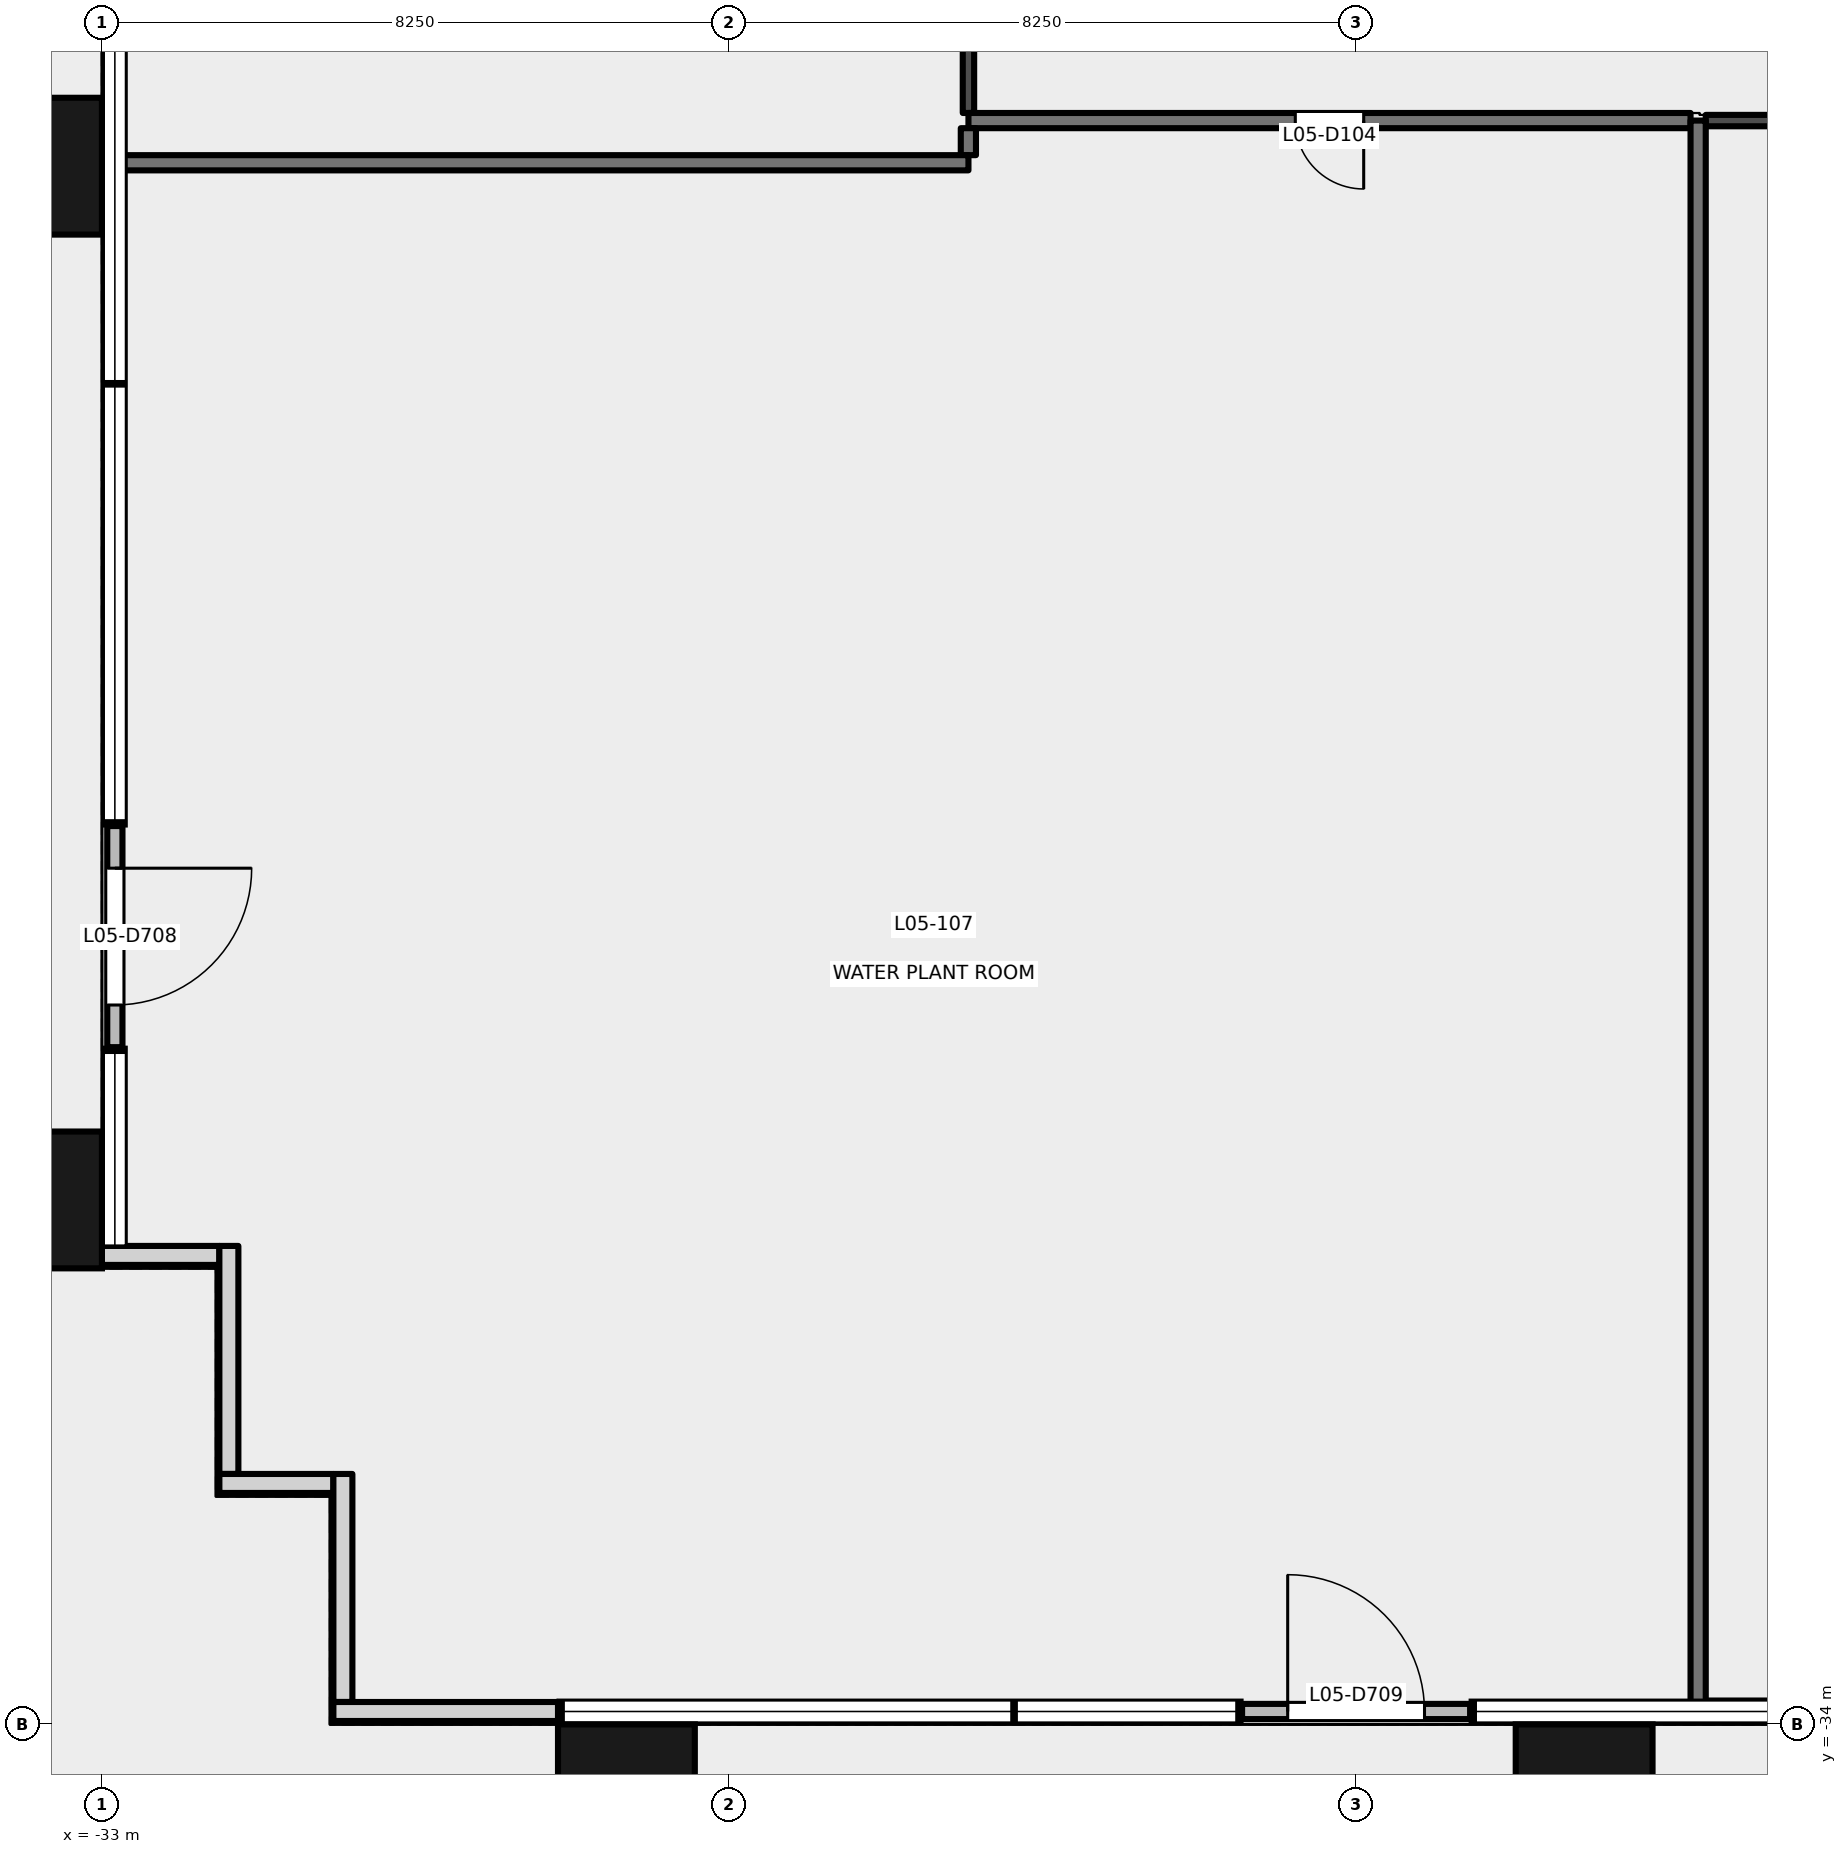
"""IFC4 building model, lengths in metres.
Left out: names, types, materials, properties, quantities, classifications, styles, units other than length and angle.
Written with IfcOpenShell. Run it as: python <this file> out.ifc"""

import sys

from ifc_helpers import new_model, si_unit, direction, frame, frame_2d, origin, origin_2d, place, context, subcontext, project, spatial, rectangle, extrude, element, fill, save


model = new_model("IFC4")
c1 = context("Model", 3, precision=1e-05, world=origin(), true_north=direction((0.0, 1.0)))
c2 = subcontext(c1, "Body", "Model", "MODEL_VIEW")
j1 = project(units=[si_unit("LENGTHUNIT", "METRE"), si_unit("PLANEANGLEUNIT", "RADIAN")], contexts=[c1])
p1 = place(None, origin())
s1 = spatial("IfcSite", under=j1, at=p1, CompositionType="ELEMENT")
p2 = place(p1, origin())
s2 = spatial("IfcBuilding", under=s1, at=p2, CompositionType="ELEMENT")
p3 = place(p2, frame((0.0, 0.0, 27.0)))
s3 = spatial("IfcBuildingStorey", under=s2, at=p3, CompositionType="ELEMENT", Elevation=27.0)
for number, where, z_axis, x_axis in (
    (1, (-26.1, -34.9, -0.2), (0.0, 0.0, 1.0), (1.0, 0.0, 0.0)),
    (2, (-13.5, -34.9, -0.2), (0.0, 0.0, 1.0), (1.0, 0.0, 0.0)),
    (3, (-33.9, -27.1, -0.2), (0.0, 0.0, 1.0), (0.0, 1.0, 0.0)),
    (4, (-33.9, -13.5, -0.2), (0.0, 0.0, 1.0), (0.0, 1.0, 0.0)),
):
    element("IfcColumn", number, at=place(p3, frame(where, z_axis=z_axis, x_axis=x_axis)), inside=s3, PredefinedType="COLUMN", context=c2, shape_type="SweptSolid", body=[
        extrude(rectangle(XDim=1.8, YDim=1.8, at=origin_2d()), origin(), (0.0, 0.0, 1.0), 5.4),
    ])
p4 = place(p3, frame((-32.83, -22.181, 0.0), z_axis=(0.0, 0.0, 1.0), x_axis=(0.0, -1.0, 0.0)))
e5 = element("IfcWall", 5, at=p4, inside=s3, PredefinedType="SOLIDWALL", context=c2, shape_type="SweptSolid", body=[
    extrude(rectangle(XDim=2.909, YDim=0.2, at=frame_2d((1.455, 0.0))), origin(), (0.0, 0.0, 1.0), 4.1),
])
p5 = place(p4, frame((0.554, 0.0, 0.0)))
e6 = element("IfcOpeningElement", 6, at=p5, cuts=e5, PredefinedType="OPENING", context=c2, shape_type="SweptSolid", body=[
    extrude(rectangle(XDim=1.8, YDim=2.4, at=frame_2d((0.9, 1.2))), frame((0.0, 0.111, 0.0), z_axis=(0.0, -1.0, 0.0), x_axis=(1.0, 0.0, 0.0)), (0.0, 0.0, 1.0), 0.221),
])
p6 = place(p3, frame((-33.005, -27.83, 0.0), z_axis=(0.0, 0.0, 1.0), x_axis=(1.0, 0.0, 0.0)))
e7 = element("IfcWall", 7, at=p6, inside=s3, PredefinedType="SOLIDWALL", context=c2, shape_type="SweptSolid", body=[
    extrude(rectangle(XDim=1.55, YDim=0.25, at=frame_2d((0.775, 0.0))), origin(), (0.0, 0.0, 1.0), 5.2),
])
p7 = place(p3, frame((-31.33, -27.705, 0.0), z_axis=(0.0, 0.0, 1.0), x_axis=(0.0, -1.0, 0.0)))
e8 = element("IfcWall", 8, at=p7, inside=s3, PredefinedType="SOLIDWALL", context=c2, shape_type="SweptSolid", body=[
    extrude(rectangle(XDim=3.0, YDim=0.25, at=frame_2d((1.5, 0.0))), origin(), (0.0, 0.0, 1.0), 5.2),
])
p8 = place(p3, frame((-31.455, -30.83, 0.0), z_axis=(0.0, 0.0, 1.0), x_axis=(1.0, 0.0, 0.0)))
e9 = element("IfcWall", 9, at=p8, inside=s3, PredefinedType="SOLIDWALL", context=c2, shape_type="SweptSolid", body=[
    extrude(rectangle(XDim=1.5, YDim=0.25, at=frame_2d((0.75, 0.0))), origin(), (0.0, 0.0, 1.0), 5.2),
])
p9 = place(p3, frame((-29.83, -30.705, 0.0), z_axis=(0.0, 0.0, 1.0), x_axis=(0.0, -1.0, 0.0)))
e10 = element("IfcWall", 10, at=p9, inside=s3, PredefinedType="SOLIDWALL", context=c2, shape_type="SweptSolid", body=[
    extrude(rectangle(XDim=3.0, YDim=0.25, at=frame_2d((1.5, 0.0))), origin(), (0.0, 0.0, 1.0), 5.2),
])
p10 = place(p3, frame((-29.955, -33.83, 0.0), z_axis=(0.0, 0.0, 1.0), x_axis=(1.0, 0.0, 0.0)))
e11 = element("IfcWall", 11, at=p10, inside=s3, PredefinedType="SOLIDWALL", context=c2, shape_type="SweptSolid", body=[
    extrude(rectangle(XDim=2.955, YDim=0.25, at=frame_2d((1.478, 0.0))), origin(), (0.0, 0.0, 1.0), 5.2),
])
p11 = place(p3, frame((-18.0, -33.83, 0.0), z_axis=(0.0, 0.0, 1.0), x_axis=(1.0, 0.0, 0.0)))
e12 = element("IfcWall", 12, at=p11, inside=s3, PredefinedType="SOLIDWALL", context=c2, shape_type="SweptSolid", body=[
    extrude(rectangle(XDim=3.0, YDim=0.2, at=frame_2d((1.5, 0.0))), origin(), (0.0, 0.0, 1.0), 4.1),
])
p12 = place(p11, frame((0.6, 0.0, 0.0)))
e13 = element("IfcOpeningElement", 13, at=p12, cuts=e12, PredefinedType="OPENING", context=c2, shape_type="SweptSolid", body=[
    extrude(rectangle(XDim=1.8, YDim=2.4, at=frame_2d((0.9, 1.2))), frame((0.0, 0.111, 0.0), z_axis=(0.0, -1.0, 0.0), x_axis=(1.0, 0.0, 0.0)), (0.0, 0.0, 1.0), 0.221),
])
p13 = place(p3, frame((-21.6, -12.8, 0.0), z_axis=(0.0, 0.0, 1.0), x_axis=(0.0, 1.0, 0.0)))
e14 = element("IfcWall", 14, at=p13, inside=s3, PredefinedType="PARTITIONING", context=c2, shape_type="SweptSolid", body=[
    extrude(rectangle(XDim=5.4, YDim=0.15, at=frame_2d((2.7, 0.0))), origin(), (0.0, 0.0, 1.0), 4.6),
])
p14 = place(p13, frame((2.575, 0.0, 0.0)))
e15 = element("IfcOpeningElement", 15, at=p14, cuts=e14, PredefinedType="OPENING", context=c2, shape_type="SweptSolid", body=[
    extrude(rectangle(XDim=1.8, YDim=2.1, at=frame_2d((0.9, 1.05))), frame((0.0, 0.085, 0.0), z_axis=(0.0, -1.0, 0.0), x_axis=(1.0, 0.0, 0.0)), (0.0, 0.0, 1.0), 0.171),
])
p15 = place(p3, frame((-0.09, -12.9, 0.0), z_axis=(0.0, 0.0, 1.0), x_axis=(-1.0, 0.0, 0.0)))
e16 = element("IfcWall", 16, at=p15, inside=s3, PredefinedType="PARTITIONING", context=c2, shape_type="SweptSolid", body=[
    extrude(rectangle(XDim=11.81, YDim=0.15, at=frame_2d((5.905, 0.0))), origin(), (0.0, 0.0, 1.0), 4.2),
])
p16 = place(p15, frame((2.627, 0.0, 0.0)))
e17 = element("IfcOpeningElement", 17, at=p16, cuts=e16, PredefinedType="OPENING", context=c2, shape_type="SweptSolid", body=[
    extrude(rectangle(XDim=1.8, YDim=2.1, at=frame_2d((0.9, 1.05))), frame((0.0, 0.085, 0.0), z_axis=(0.0, -1.0, 0.0), x_axis=(1.0, 0.0, 0.0)), (0.0, 0.0, 1.0), 0.171),
])
p17 = place(p15, frame((6.919, 0.0, 0.0)))
e18 = element("IfcOpeningElement", 18, at=p17, cuts=e16, PredefinedType="OPENING", context=c2, shape_type="SweptSolid", body=[
    extrude(rectangle(XDim=2.4, YDim=2.4, at=frame_2d((1.2, 1.2))), frame((0.0, 0.085, 0.0), z_axis=(0.0, -1.0, 0.0), x_axis=(1.0, 0.0, 0.0)), (0.0, 0.0, 1.0), 0.171),
])
p18 = place(p3, frame((-12.1, -12.9, 0.0), z_axis=(0.0, 0.0, 1.0), x_axis=(-1.0, 0.0, 0.0)))
e19 = element("IfcWall", 19, at=p18, inside=s3, PredefinedType="PARTITIONING", context=c2, shape_type="SweptSolid", body=[
    extrude(rectangle(XDim=9.5, YDim=0.2, at=frame_2d((4.75, 0.0))), origin(), (0.0, 0.0, 1.0), 3.8),
])
p19 = place(p18, frame((4.3, 0.0, 0.0)))
e20 = element("IfcOpeningElement", 20, at=p19, cuts=e19, PredefinedType="OPENING", context=c2, shape_type="SweptSolid", body=[
    extrude(rectangle(XDim=0.9, YDim=2.1, at=frame_2d((0.45, 1.05))), frame((0.0, 0.111, 0.0), z_axis=(0.0, -1.0, 0.0), x_axis=(1.0, 0.0, 0.0)), (0.0, 0.0, 1.0), 0.221),
])
p20 = place(p3, frame((-21.601, -13.0, 0.0), z_axis=(0.0, 0.0, 1.0), x_axis=(0.0, -1.0, 0.0)))
e21 = element("IfcWall", 21, at=p20, inside=s3, PredefinedType="PARTITIONING", context=c2, shape_type="SweptSolid", body=[
    extrude(rectangle(XDim=0.355, YDim=0.2, at=frame_2d((0.177, 0.0))), origin(), (0.0, 0.0, 1.0), 4.6),
])
p21 = place(p3, frame((-21.6, -13.455, 0.0), z_axis=(0.0, 0.0, 1.0), x_axis=(-1.0, 0.0, 0.0)))
e22 = element("IfcWall", 22, at=p21, inside=s3, PredefinedType="PARTITIONING", context=c2, shape_type="SweptSolid", body=[
    extrude(rectangle(XDim=11.14, YDim=0.2, at=frame_2d((5.57, 0.0))), origin(), (0.0, 0.0, 1.0), 4.6),
])
p22 = place(p3, frame((-12.0, -33.74, 0.0), z_axis=(0.0, 0.0, 1.0), x_axis=(0.0, 1.0, 0.0)))
e23 = element("IfcWall", 23, at=p22, inside=s3, PredefinedType="PARTITIONING", context=c2, shape_type="SweptSolid", body=[
    extrude(rectangle(XDim=20.84, YDim=0.2, at=frame_2d((10.42, 0.0))), origin(), (0.0, 0.0, 1.0), 5.2),
])
p23 = place(p5, origin())
e24 = element("IfcDoor", 24, at=p23, inside=s3, OperationType="DOUBLE_DOOR_SINGLE_SWING", PredefinedType="DOOR", context=c2, shape_type="SweptSolid", body=[
    extrude(rectangle(XDim=1.8, YDim=2.4, at=frame_2d((0.9, 1.2))), frame((0.0, 0.025, 0.0), z_axis=(0.0, -1.0, 0.0), x_axis=(1.0, 0.0, 0.0)), (0.0, 0.0, 1.0), 0.05),
])
fill(e6, e24)
p24 = place(p12, origin())
e25 = element("IfcDoor", 25, at=p24, inside=s3, OperationType="DOUBLE_DOOR_SINGLE_SWING", PredefinedType="DOOR", context=c2, shape_type="SweptSolid", body=[
    extrude(rectangle(XDim=1.8, YDim=2.4, at=frame_2d((0.9, 1.2))), frame((0.0, 0.025, 0.0), z_axis=(0.0, -1.0, 0.0), x_axis=(1.0, 0.0, 0.0)), (0.0, 0.0, 1.0), 0.05),
])
fill(e13, e25)
p25 = place(p19, origin())
e26 = element("IfcDoor", 26, at=p25, inside=s3, OperationType="SINGLE_SWING_LEFT", PredefinedType="DOOR", context=c2, shape_type="SweptSolid", body=[
    extrude(rectangle(XDim=0.9, YDim=2.1, at=frame_2d((0.45, 1.05))), frame((0.0, 0.025, 0.0), z_axis=(0.0, -1.0, 0.0), x_axis=(1.0, 0.0, 0.0)), (0.0, 0.0, 1.0), 0.05),
])
fill(e20, e26)
save(model, sys.argv[1])
